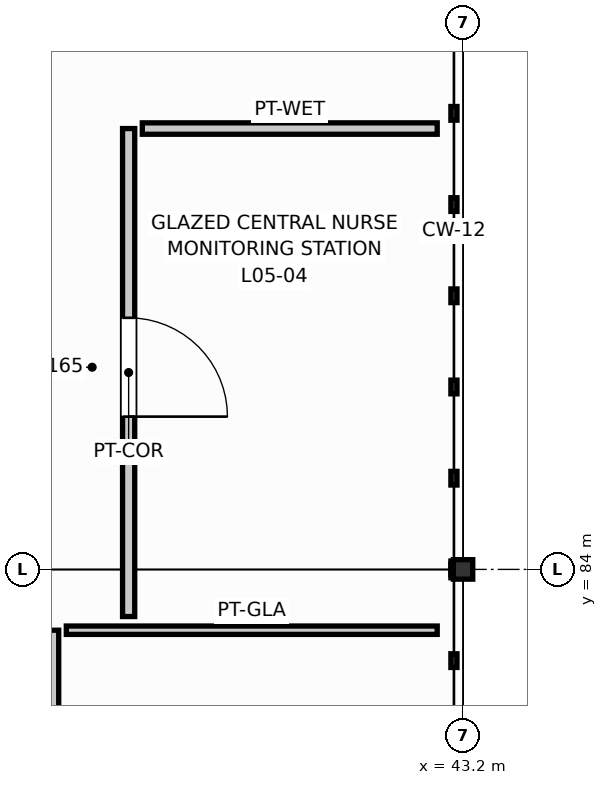
"""IFC4 building model, lengths in metres.
Left out: names, types, materials, properties, quantities, classifications, styles, units other than length and angle.
Written with IfcOpenShell. Run it as: python <this file> out.ifc"""

import sys

from ifc_helpers import new_model, si_unit, direction, frame, frame_2d, origin, origin_2d, place, context, subcontext, project, spatial, rectangle, i_section, extrude, element, fill, save


model = new_model("IFC4")
c1 = context("Model", 3, precision=1e-05, world=origin(), true_north=direction((0.0, 1.0)))
c2 = subcontext(c1, "Body", "Model", "MODEL_VIEW")
j1 = project(units=[si_unit("LENGTHUNIT", "METRE"), si_unit("PLANEANGLEUNIT", "RADIAN")], contexts=[c1])
p1 = place(None, origin())
s1 = spatial("IfcSite", under=j1, at=p1, CompositionType="ELEMENT")
p2 = place(p1, origin())
s2 = spatial("IfcBuilding", under=s1, at=p2, CompositionType="ELEMENT")
p3 = place(p2, frame((0.0, 0.0, 21.6)))
s3 = spatial("IfcBuildingStorey", under=s2, at=p3, CompositionType="ELEMENT", Elevation=21.6)
p4 = place(p3, frame((43.2, 84.0, 0.0), z_axis=(0.0, 0.0, 1.0), x_axis=(1.0, 0.0, 0.0)))
e1 = element("IfcColumn", 1, at=p4, inside=s3, PredefinedType="COLUMN", context=c2, shape_type="SweptSolid", body=[
    extrude(i_section(OverallWidth=0.255, OverallDepth=0.256, WebThickness=0.01, FlangeThickness=0.016, FilletRadius=0.013, at=origin_2d()), origin(), (0.0, 0.0, 1.0), 4.2),
])
p5 = place(p3, frame((37.8, 75.465, 0.0), z_axis=(0.0, 0.0, 1.0), x_axis=(0.0, 1.0, 0.0)))
e2 = element("IfcWall", 2, at=p5, inside=s3, PredefinedType="PARTITIONING", context=c2, shape_type="SweptSolid", body=[
    extrude(rectangle(XDim=7.735, YDim=0.16, at=frame_2d((3.867, 0.0))), origin(), (0.0, 0.0, 1.0), 3.401),
])
p6 = place(p5, frame((3.312, 0.0, 0.0)))
e3 = element("IfcOpeningElement", 3, at=p6, cuts=e2, PredefinedType="OPENING", context=c2, shape_type="SweptSolid", body=[
    extrude(rectangle(XDim=1.25, YDim=2.15, at=frame_2d((0.625, 1.075))), frame((0.0, 0.09, 0.0), z_axis=(0.0, -1.0, 0.0), x_axis=(1.0, 0.0, 0.0)), (0.0, 0.0, 1.0), 0.18),
])
p7 = place(p3, frame((37.98, 83.2, 0.0), z_axis=(0.0, 0.0, 1.0), x_axis=(1.0, 0.0, 0.0)))
e4 = element("IfcWall", 4, at=p7, inside=s3, PredefinedType="MOVABLE", context=c2, shape_type="SweptSolid", body=[
    extrude(rectangle(XDim=4.88, YDim=0.11, at=frame_2d((2.44, 0.0))), origin(), (0.0, 0.0, 1.0), 3.945),
])
p8 = place(p3, frame((38.8, 83.38, 0.0), z_axis=(0.0, 0.0, 1.0), x_axis=(0.0, 1.0, 0.0)))
e5 = element("IfcWall", 5, at=p8, inside=s3, PredefinedType="PARTITIONING", context=c2, shape_type="SweptSolid", body=[
    extrude(rectangle(XDim=6.42, YDim=0.16, at=frame_2d((3.21, 0.0))), origin(), (0.0, 0.0, 1.0), 3.479),
])
p9 = place(p8, frame((2.63, 0.0, 0.0)))
e6 = element("IfcOpeningElement", 6, at=p9, cuts=e5, PredefinedType="OPENING", context=c2, shape_type="SweptSolid", body=[
    extrude(rectangle(XDim=1.3, YDim=2.15, at=frame_2d((0.65, 1.075))), frame((0.0, 0.09, 0.0), z_axis=(0.0, -1.0, 0.0), x_axis=(1.0, 0.0, 0.0)), (0.0, 0.0, 1.0), 0.18),
])
p10 = place(p3, frame((38.98, 89.8, 0.0), z_axis=(0.0, 0.0, 1.0), x_axis=(1.0, 0.0, 0.0)))
e7 = element("IfcWall", 7, at=p10, inside=s3, PredefinedType="PLUMBINGWALL", context=c2, shape_type="SweptSolid", body=[
    extrude(rectangle(XDim=3.88, YDim=0.15, at=frame_2d((1.94, 0.0))), origin(), (0.0, 0.0, 1.0), 3.945),
])
p11 = place(p9, frame((1.3, 0.0, 0.0), z_axis=(0.0, 0.0, 1.0), x_axis=(-1.0, 0.0, 0.0)))
e8 = element("IfcDoor", 8, at=p11, inside=s3, OperationType="SINGLE_SWING_RIGHT", PredefinedType="DOOR", context=c2, shape_type="SweptSolid", body=[
    extrude(rectangle(XDim=1.3, YDim=2.15, at=frame_2d((0.65, 1.075))), frame((0.0, 0.025, 0.0), z_axis=(0.0, -1.0, 0.0), x_axis=(1.0, 0.0, 0.0)), (0.0, 0.0, 1.0), 0.05),
])
fill(e6, e8)
save(model, sys.argv[1])
